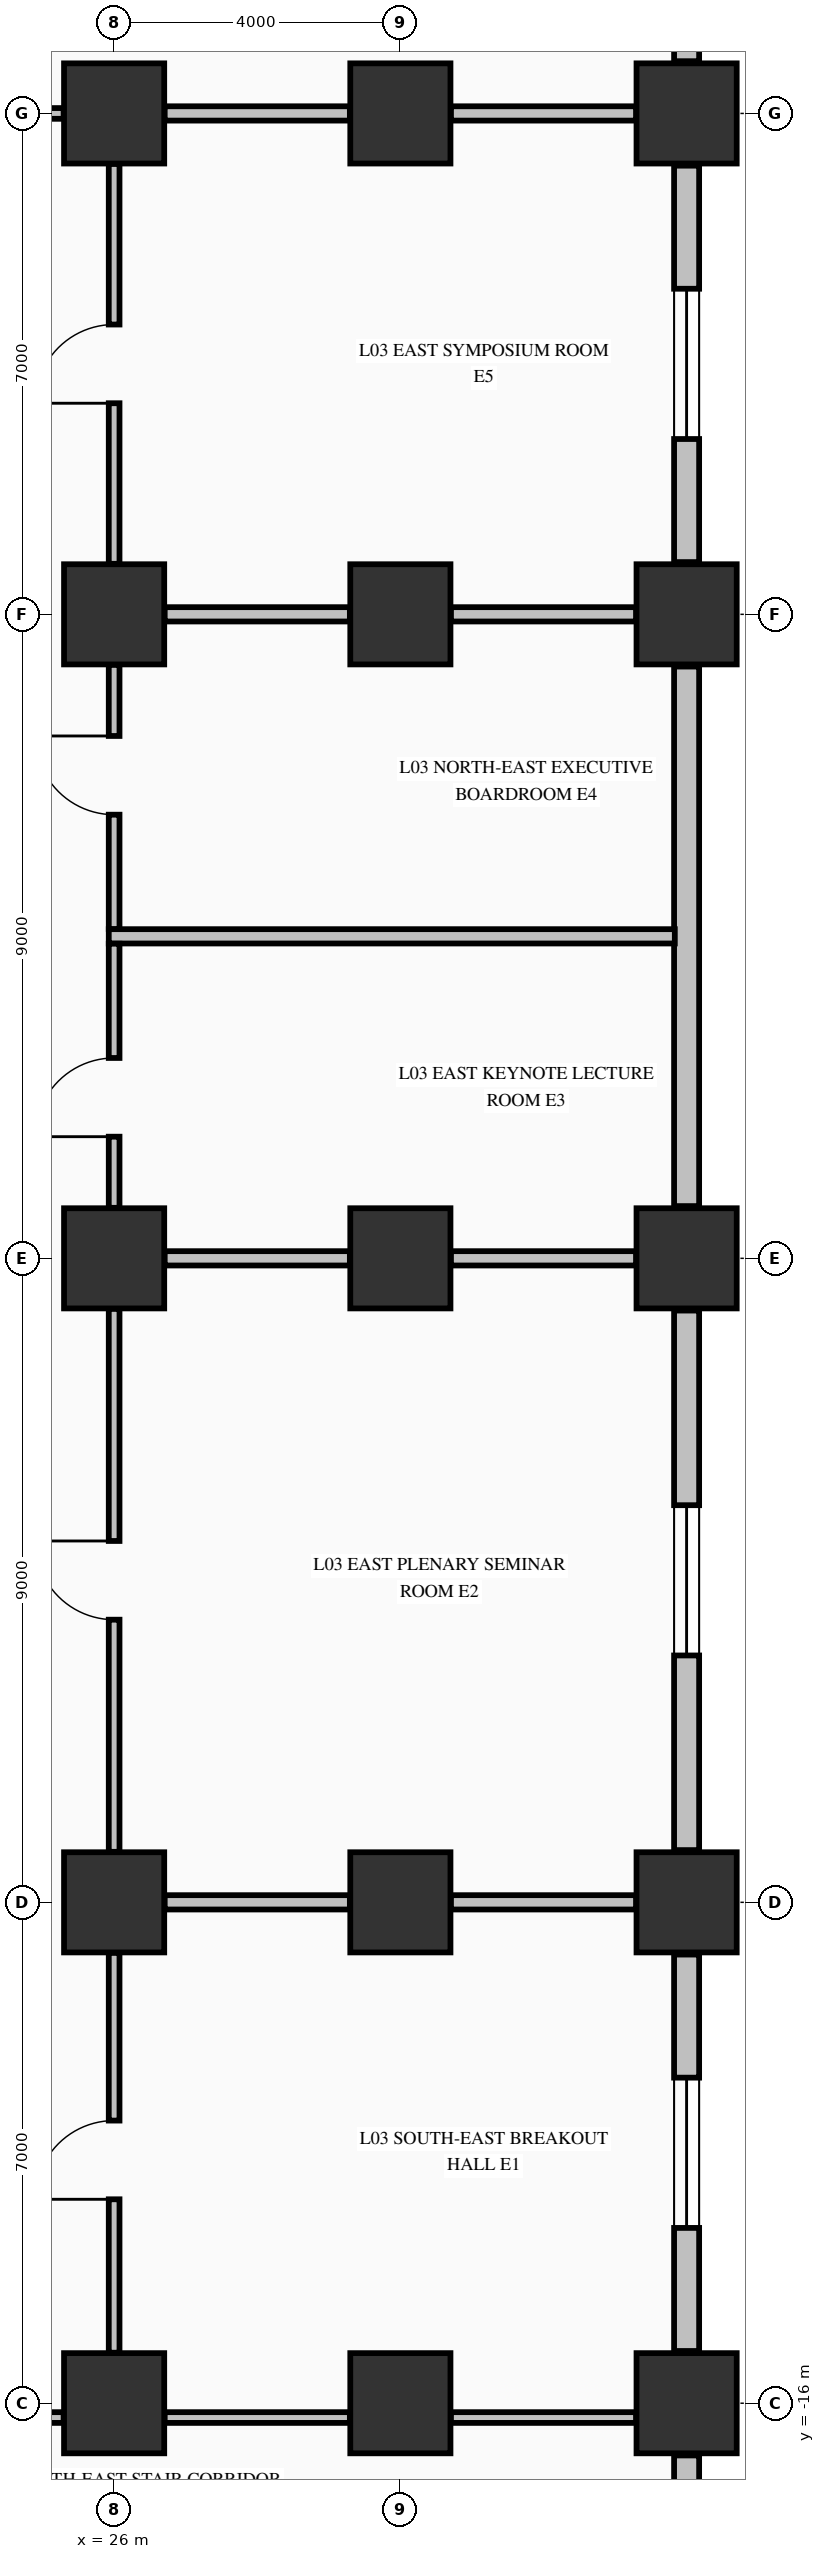
"""IFC4 building model, lengths in metres.
Left out: names, types, materials, properties, quantities, classifications, styles, units other than length and angle.
Written with IfcOpenShell. Run it as: python <this file> out.ifc"""

import sys

from ifc_helpers import new_model, si_unit, direction, frame, frame_2d, origin, origin_2d, place, context, subcontext, project, spatial, rectangle, extrude, element, fill, save


model = new_model("IFC4")
c1 = context("Model", 3, precision=1e-05, world=origin(), true_north=direction((0.0, 1.0)))
c2 = subcontext(c1, "Body", "Model", "MODEL_VIEW")
j1 = project(units=[si_unit("LENGTHUNIT", "METRE"), si_unit("PLANEANGLEUNIT", "RADIAN")], contexts=[c1])
p1 = place(None, origin())
s1 = spatial("IfcSite", under=j1, at=p1, CompositionType="ELEMENT")
p2 = place(p1, origin())
s2 = spatial("IfcBuilding", under=s1, at=p2, CompositionType="ELEMENT")
p3 = place(p2, frame((0.0, 0.0, 16.32)))
s3 = spatial("IfcBuildingStorey", under=s2, at=p3, CompositionType="ELEMENT", Elevation=16.32)
for number, where, z_axis, x_axis in (
    (1, (26.0, -16.0, 0.0), (0.0, 0.0, 1.0), (1.0, 0.0, 0.0)),
    (2, (26.0, -9.0, 0.0), (0.0, 0.0, 1.0), (1.0, 0.0, 0.0)),
    (3, (26.0, 0.0, 0.0), (0.0, 0.0, 1.0), (1.0, 0.0, 0.0)),
    (4, (26.0, 9.0, 0.0), (0.0, 0.0, 1.0), (1.0, 0.0, 0.0)),
    (5, (26.0, 16.0, 0.0), (0.0, 0.0, 1.0), (1.0, 0.0, 0.0)),
    (6, (30.0, -16.0, 0.0), (0.0, 0.0, 1.0), (1.0, 0.0, 0.0)),
    (7, (30.0, -9.0, 0.0), (0.0, 0.0, 1.0), (1.0, 0.0, 0.0)),
    (8, (30.0, 0.0, 0.0), (0.0, 0.0, 1.0), (1.0, 0.0, 0.0)),
    (9, (30.0, 9.0, 0.0), (0.0, 0.0, 1.0), (1.0, 0.0, 0.0)),
    (10, (30.0, 16.0, 0.0), (0.0, 0.0, 1.0), (1.0, 0.0, 0.0)),
    (11, (34.0, -16.0, 0.0), (0.0, 0.0, 1.0), (1.0, 0.0, 0.0)),
    (12, (34.0, -9.0, 0.0), (0.0, 0.0, 1.0), (1.0, 0.0, 0.0)),
    (13, (34.0, 0.0, 0.0), (0.0, 0.0, 1.0), (1.0, 0.0, 0.0)),
    (14, (34.0, 9.0, 0.0), (0.0, 0.0, 1.0), (1.0, 0.0, 0.0)),
    (15, (34.0, 16.0, 0.0), (0.0, 0.0, 1.0), (1.0, 0.0, 0.0)),
):
    element("IfcColumn", number, at=place(p3, frame(where, z_axis=z_axis, x_axis=x_axis)), inside=s3, PredefinedType="COLUMN", context=c2, shape_type="SweptSolid", body=[
        extrude(rectangle(XDim=1.4, YDim=1.4, at=origin_2d()), origin(), (0.0, 0.0, 1.0), 4.99),
    ])
p4 = place(p3, frame((34.0, -16.73, 0.0), z_axis=(0.0, 0.0, 1.0), x_axis=(0.0, -1.0, 0.0)))
e16 = element("IfcWall", 16, at=p4, inside=s3, PredefinedType="STANDARD", context=c2, shape_type="SweptSolid", body=[
    extrude(rectangle(XDim=4.54, YDim=0.35, at=frame_2d((2.27, 0.0))), origin(), (0.0, 0.0, 1.0), 4.99),
])
p5 = place(p3, frame((34.0, -9.73, 0.0), z_axis=(0.0, 0.0, 1.0), x_axis=(0.0, -1.0, 0.0)))
e17 = element("IfcWall", 17, at=p5, inside=s3, PredefinedType="STANDARD", context=c2, shape_type="SweptSolid", body=[
    extrude(rectangle(XDim=5.54, YDim=0.35, at=frame_2d((2.77, 0.0))), origin(), (0.0, 0.0, 1.0), 3.332),
])
p6 = place(p5, frame((1.72, 0.0, 0.75)))
e18 = element("IfcOpeningElement", 18, at=p6, cuts=e17, PredefinedType="OPENING", context=c2, shape_type="SweptSolid", body=[
    extrude(rectangle(XDim=2.1, YDim=1.75, at=frame_2d((1.05, 0.875))), frame((0.0, 0.185, 0.0), z_axis=(0.0, -1.0, 0.0), x_axis=(1.0, 0.0, 0.0)), (0.0, 0.0, 1.0), 0.37),
])
p7 = place(p3, frame((34.0, -0.73, 0.0), z_axis=(0.0, 0.0, 1.0), x_axis=(0.0, -1.0, 0.0)))
e19 = element("IfcWall", 19, at=p7, inside=s3, PredefinedType="STANDARD", context=c2, shape_type="SweptSolid", body=[
    extrude(rectangle(XDim=7.54, YDim=0.35, at=frame_2d((3.77, 0.0))), origin(), (0.0, 0.0, 1.0), 3.332),
])
p8 = place(p7, frame((2.72, 0.0, 0.75)))
e20 = element("IfcOpeningElement", 20, at=p8, cuts=e19, PredefinedType="OPENING", context=c2, shape_type="SweptSolid", body=[
    extrude(rectangle(XDim=2.1, YDim=1.75, at=frame_2d((1.05, 0.875))), frame((0.0, 0.185, 0.0), z_axis=(0.0, -1.0, 0.0), x_axis=(1.0, 0.0, 0.0)), (0.0, 0.0, 1.0), 0.37),
])
p9 = place(p3, frame((34.0, 8.27, 0.0), z_axis=(0.0, 0.0, 1.0), x_axis=(0.0, -1.0, 0.0)))
e21 = element("IfcWall", 21, at=p9, inside=s3, PredefinedType="STANDARD", context=c2, shape_type="SweptSolid", body=[
    extrude(rectangle(XDim=7.54, YDim=0.35, at=frame_2d((3.77, 0.0))), origin(), (0.0, 0.0, 1.0), 3.332),
])
p10 = place(p3, frame((34.0, 15.27, 0.0), z_axis=(0.0, 0.0, 1.0), x_axis=(0.0, -1.0, 0.0)))
e22 = element("IfcWall", 22, at=p10, inside=s3, PredefinedType="STANDARD", context=c2, shape_type="SweptSolid", body=[
    extrude(rectangle(XDim=5.54, YDim=0.35, at=frame_2d((2.77, 0.0))), origin(), (0.0, 0.0, 1.0), 3.332),
])
p11 = place(p10, frame((1.72, 0.0, 0.75)))
e23 = element("IfcOpeningElement", 23, at=p11, cuts=e22, PredefinedType="OPENING", context=c2, shape_type="SweptSolid", body=[
    extrude(rectangle(XDim=2.1, YDim=1.75, at=frame_2d((1.05, 0.875))), frame((0.0, 0.185, 0.0), z_axis=(0.0, -1.0, 0.0), x_axis=(1.0, 0.0, 0.0)), (0.0, 0.0, 1.0), 0.37),
])
p12 = place(p3, frame((34.0, 21.27, 0.0), z_axis=(0.0, 0.0, 1.0), x_axis=(0.0, -1.0, 0.0)))
e24 = element("IfcWall", 24, at=p12, inside=s3, PredefinedType="STANDARD", context=c2, shape_type="SweptSolid", body=[
    extrude(rectangle(XDim=4.54, YDim=0.35, at=frame_2d((2.27, 0.0))), origin(), (0.0, 0.0, 1.0), 4.99),
])
p13 = place(p3, frame((20.806, -16.2, 0.0), z_axis=(0.0, 0.0, 1.0), x_axis=(1.0, 0.0, 0.0)))
e25 = element("IfcWall", 25, at=p13, inside=s3, PredefinedType="PARTITIONING", context=c2, shape_type="SweptSolid", body=[
    extrude(rectangle(XDim=4.488, YDim=0.15, at=frame_2d((2.244, 0.0))), origin(), (0.0, 0.0, 1.0), 3.332),
])
p14 = place(p13, frame((0.15, 0.0, 0.0)))
e26 = element("IfcOpeningElement", 26, at=p14, cuts=e25, PredefinedType="OPENING", context=c2, shape_type="SweptSolid", body=[
    extrude(rectangle(XDim=1.1, YDim=2.15, at=frame_2d((0.55, 1.075))), frame((0.0, 0.085, 0.0), z_axis=(0.0, -1.0, 0.0), x_axis=(1.0, 0.0, 0.0)), (0.0, 0.0, 1.0), 0.17),
])
p15 = place(p13, frame((2.844, 0.0, 0.0)))
e27 = element("IfcOpeningElement", 27, at=p15, cuts=e25, PredefinedType="OPENING", context=c2, shape_type="SweptSolid", body=[
    extrude(rectangle(XDim=1.1, YDim=2.15, at=frame_2d((0.55, 1.075))), frame((0.0, 0.085, 0.0), z_axis=(0.0, -1.0, 0.0), x_axis=(1.0, 0.0, 0.0)), (0.0, 0.0, 1.0), 0.17),
])
for number, where, z_axis, x_axis in (
    (28, (26.706, -16.2, 0.0), (0.0, 0.0, 1.0), (1.0, 0.0, 0.0)),
    (29, (30.706, -16.2, 0.0), (0.0, 0.0, 1.0), (1.0, 0.0, 0.0)),
):
    element("IfcWall", number, at=place(p3, frame(where, z_axis=z_axis, x_axis=x_axis)), inside=s3, PredefinedType="PARTITIONING", context=c2, shape_type="SweptSolid", body=[
        extrude(rectangle(XDim=2.588, YDim=0.15, at=frame_2d((1.294, 0.0))), origin(), (0.0, 0.0, 1.0), 3.332),
    ])
for number, where, z_axis, x_axis in (
    (30, (26.706, -9.0, 0.0), (0.0, 0.0, 1.0), (1.0, 0.0, 0.0)),
    (31, (30.706, -9.0, 0.0), (0.0, 0.0, 1.0), (1.0, 0.0, 0.0)),
    (32, (26.706, 0.0, 0.0), (0.0, 0.0, 1.0), (1.0, 0.0, 0.0)),
    (33, (30.706, 0.0, 0.0), (0.0, 0.0, 1.0), (1.0, 0.0, 0.0)),
):
    element("IfcWall", number, at=place(p3, frame(where, z_axis=z_axis, x_axis=x_axis)), inside=s3, PredefinedType="PARTITIONING", context=c2, shape_type="SweptSolid", body=[
        extrude(rectangle(XDim=2.588, YDim=0.2, at=frame_2d((1.294, 0.0))), origin(), (0.0, 0.0, 1.0), 3.332),
    ])
p16 = place(p3, frame((25.925, 4.5, 0.0), z_axis=(0.0, 0.0, 1.0), x_axis=(1.0, 0.0, 0.0)))
e34 = element("IfcWall", 34, at=p16, inside=s3, PredefinedType="PARTITIONING", context=c2, shape_type="SweptSolid", body=[
    extrude(rectangle(XDim=7.91, YDim=0.2, at=frame_2d((3.955, 0.0))), origin(), (0.0, 0.0, 1.0), 4.38),
])
for number, where, z_axis, x_axis in (
    (35, (26.706, 9.0, 0.0), (0.0, 0.0, 1.0), (1.0, 0.0, 0.0)),
    (36, (30.706, 9.0, 0.0), (0.0, 0.0, 1.0), (1.0, 0.0, 0.0)),
):
    element("IfcWall", number, at=place(p3, frame(where, z_axis=z_axis, x_axis=x_axis)), inside=s3, PredefinedType="PARTITIONING", context=c2, shape_type="SweptSolid", body=[
        extrude(rectangle(XDim=2.588, YDim=0.2, at=frame_2d((1.294, 0.0))), origin(), (0.0, 0.0, 1.0), 3.332),
    ])
p17 = place(p3, frame((20.806, 16.0, 0.0), z_axis=(0.0, 0.0, 1.0), x_axis=(1.0, 0.0, 0.0)))
e37 = element("IfcWall", 37, at=p17, inside=s3, PredefinedType="PARTITIONING", context=c2, shape_type="SweptSolid", body=[
    extrude(rectangle(XDim=4.488, YDim=0.15, at=frame_2d((2.244, 0.0))), origin(), (0.0, 0.0, 1.0), 3.332),
])
p18 = place(p17, frame((0.15, 0.0, 0.0)))
e38 = element("IfcOpeningElement", 38, at=p18, cuts=e37, PredefinedType="OPENING", context=c2, shape_type="SweptSolid", body=[
    extrude(rectangle(XDim=1.1, YDim=2.15, at=frame_2d((0.55, 1.075))), frame((0.0, 0.085, 0.0), z_axis=(0.0, -1.0, 0.0), x_axis=(1.0, 0.0, 0.0)), (0.0, 0.0, 1.0), 0.17),
])
p19 = place(p17, frame((2.844, 0.0, 0.0)))
e39 = element("IfcOpeningElement", 39, at=p19, cuts=e37, PredefinedType="OPENING", context=c2, shape_type="SweptSolid", body=[
    extrude(rectangle(XDim=1.1, YDim=2.15, at=frame_2d((0.55, 1.075))), frame((0.0, 0.085, 0.0), z_axis=(0.0, -1.0, 0.0), x_axis=(1.0, 0.0, 0.0)), (0.0, 0.0, 1.0), 0.17),
])
for number, where, z_axis, x_axis in (
    (40, (26.706, 16.0, 0.0), (0.0, 0.0, 1.0), (1.0, 0.0, 0.0)),
    (41, (30.706, 16.0, 0.0), (0.0, 0.0, 1.0), (1.0, 0.0, 0.0)),
):
    element("IfcWall", number, at=place(p3, frame(where, z_axis=z_axis, x_axis=x_axis)), inside=s3, PredefinedType="PARTITIONING", context=c2, shape_type="SweptSolid", body=[
        extrude(rectangle(XDim=2.588, YDim=0.2, at=frame_2d((1.294, 0.0))), origin(), (0.0, 0.0, 1.0), 3.332),
    ])
p20 = place(p3, frame((26.0, -15.294, 0.0), z_axis=(0.0, 0.0, 1.0), x_axis=(0.0, 1.0, 0.0)))
e42 = element("IfcWall", 42, at=p20, inside=s3, PredefinedType="PARTITIONING", context=c2, shape_type="SweptSolid", body=[
    extrude(rectangle(XDim=5.588, YDim=0.15, at=frame_2d((2.794, 0.0))), origin(), (0.0, 0.0, 1.0), 3.332),
])
p21 = place(p20, frame((2.144, 0.0, 0.0)))
e43 = element("IfcOpeningElement", 43, at=p21, cuts=e42, PredefinedType="OPENING", context=c2, shape_type="SweptSolid", body=[
    extrude(rectangle(XDim=1.1, YDim=2.15, at=frame_2d((0.55, 1.075))), frame((0.0, 0.085, 0.0), z_axis=(0.0, -1.0, 0.0), x_axis=(1.0, 0.0, 0.0)), (0.0, 0.0, 1.0), 0.17),
])
p22 = place(p3, frame((26.0, -8.294, 0.0), z_axis=(0.0, 0.0, 1.0), x_axis=(0.0, 1.0, 0.0)))
e44 = element("IfcWall", 44, at=p22, inside=s3, PredefinedType="PARTITIONING", context=c2, shape_type="SweptSolid", body=[
    extrude(rectangle(XDim=7.588, YDim=0.15, at=frame_2d((3.794, 0.0))), origin(), (0.0, 0.0, 1.0), 3.332),
])
p23 = place(p22, frame((3.244, 0.0, 0.0)))
e45 = element("IfcOpeningElement", 45, at=p23, cuts=e44, PredefinedType="OPENING", context=c2, shape_type="SweptSolid", body=[
    extrude(rectangle(XDim=1.1, YDim=2.15, at=frame_2d((0.55, 1.075))), frame((0.0, 0.085, 0.0), z_axis=(0.0, -1.0, 0.0), x_axis=(1.0, 0.0, 0.0)), (0.0, 0.0, 1.0), 0.17),
])
p24 = place(p3, frame((26.0, 0.706, 0.0), z_axis=(0.0, 0.0, 1.0), x_axis=(0.0, 1.0, 0.0)))
e46 = element("IfcWall", 46, at=p24, inside=s3, PredefinedType="PARTITIONING", context=c2, shape_type="SweptSolid", body=[
    extrude(rectangle(XDim=3.691, YDim=0.15, at=frame_2d((1.845, 0.0))), origin(), (0.0, 0.0, 1.0), 3.332),
])
p25 = place(p24, frame((0.994, 0.0, 0.0)))
e47 = element("IfcOpeningElement", 47, at=p25, cuts=e46, PredefinedType="OPENING", context=c2, shape_type="SweptSolid", body=[
    extrude(rectangle(XDim=1.1, YDim=2.15, at=frame_2d((0.55, 1.075))), frame((0.0, 0.085, 0.0), z_axis=(0.0, -1.0, 0.0), x_axis=(1.0, 0.0, 0.0)), (0.0, 0.0, 1.0), 0.17),
])
p26 = place(p3, frame((26.0, 4.603, 0.0), z_axis=(0.0, 0.0, 1.0), x_axis=(0.0, 1.0, 0.0)))
e48 = element("IfcWall", 48, at=p26, inside=s3, PredefinedType="PARTITIONING", context=c2, shape_type="SweptSolid", body=[
    extrude(rectangle(XDim=3.691, YDim=0.15, at=frame_2d((1.845, 0.0))), origin(), (0.0, 0.0, 1.0), 3.332),
])
p27 = place(p26, frame((1.597, 0.0, 0.0)))
e49 = element("IfcOpeningElement", 49, at=p27, cuts=e48, PredefinedType="OPENING", context=c2, shape_type="SweptSolid", body=[
    extrude(rectangle(XDim=1.1, YDim=2.15, at=frame_2d((0.55, 1.075))), frame((0.0, 0.085, 0.0), z_axis=(0.0, -1.0, 0.0), x_axis=(1.0, 0.0, 0.0)), (0.0, 0.0, 1.0), 0.17),
])
p28 = place(p3, frame((26.0, 9.706, 0.0), z_axis=(0.0, 0.0, 1.0), x_axis=(0.0, 1.0, 0.0)))
e50 = element("IfcWall", 50, at=p28, inside=s3, PredefinedType="PARTITIONING", context=c2, shape_type="SweptSolid", body=[
    extrude(rectangle(XDim=5.588, YDim=0.15, at=frame_2d((2.794, 0.0))), origin(), (0.0, 0.0, 1.0), 3.332),
])
p29 = place(p28, frame((2.244, 0.0, 0.0)))
e51 = element("IfcOpeningElement", 51, at=p29, cuts=e50, PredefinedType="OPENING", context=c2, shape_type="SweptSolid", body=[
    extrude(rectangle(XDim=1.1, YDim=2.15, at=frame_2d((0.55, 1.075))), frame((0.0, 0.085, 0.0), z_axis=(0.0, -1.0, 0.0), x_axis=(1.0, 0.0, 0.0)), (0.0, 0.0, 1.0), 0.17),
])
p30 = place(p6, origin())
e52 = element("IfcWindow", 52, at=p30, inside=s3, PartitioningType="SINGLE_PANEL", PredefinedType="WINDOW", context=c2, shape_type="SweptSolid", body=[
    extrude(rectangle(XDim=2.1, YDim=1.75, at=frame_2d((1.05, 0.875))), frame((0.0, 0.03, 0.0), z_axis=(0.0, -1.0, 0.0), x_axis=(1.0, 0.0, 0.0)), (0.0, 0.0, 1.0), 0.06),
])
fill(e18, e52)
p31 = place(p8, origin())
e53 = element("IfcWindow", 53, at=p31, inside=s3, PartitioningType="SINGLE_PANEL", PredefinedType="WINDOW", context=c2, shape_type="SweptSolid", body=[
    extrude(rectangle(XDim=2.1, YDim=1.75, at=frame_2d((1.05, 0.875))), frame((0.0, 0.03, 0.0), z_axis=(0.0, -1.0, 0.0), x_axis=(1.0, 0.0, 0.0)), (0.0, 0.0, 1.0), 0.06),
])
fill(e20, e53)
p32 = place(p11, origin())
e54 = element("IfcWindow", 54, at=p32, inside=s3, PartitioningType="SINGLE_PANEL", PredefinedType="WINDOW", context=c2, shape_type="SweptSolid", body=[
    extrude(rectangle(XDim=2.1, YDim=1.75, at=frame_2d((1.05, 0.875))), frame((0.0, 0.03, 0.0), z_axis=(0.0, -1.0, 0.0), x_axis=(1.0, 0.0, 0.0)), (0.0, 0.0, 1.0), 0.06),
])
fill(e23, e54)
p33 = place(p21, origin())
e55 = element("IfcDoor", 55, at=p33, inside=s3, OperationType="SINGLE_SWING_LEFT", PredefinedType="DOOR", context=c2, shape_type="SweptSolid", body=[
    extrude(rectangle(XDim=1.1, YDim=2.15, at=frame_2d((0.55, 1.075))), frame((0.0, 0.025, 0.0), z_axis=(0.0, -1.0, 0.0), x_axis=(1.0, 0.0, 0.0)), (0.0, 0.0, 1.0), 0.05),
])
fill(e43, e55)
p34 = place(p23, origin())
e56 = element("IfcDoor", 56, at=p34, inside=s3, OperationType="SINGLE_SWING_RIGHT", PredefinedType="DOOR", context=c2, shape_type="SweptSolid", body=[
    extrude(rectangle(XDim=1.1, YDim=2.15, at=frame_2d((0.55, 1.075))), frame((0.0, 0.025, 0.0), z_axis=(0.0, -1.0, 0.0), x_axis=(1.0, 0.0, 0.0)), (0.0, 0.0, 1.0), 0.05),
])
fill(e45, e56)
p35 = place(p25, origin())
e57 = element("IfcDoor", 57, at=p35, inside=s3, OperationType="SINGLE_SWING_LEFT", PredefinedType="DOOR", context=c2, shape_type="SweptSolid", body=[
    extrude(rectangle(XDim=1.1, YDim=2.15, at=frame_2d((0.55, 1.075))), frame((0.0, 0.025, 0.0), z_axis=(0.0, -1.0, 0.0), x_axis=(1.0, 0.0, 0.0)), (0.0, 0.0, 1.0), 0.05),
])
fill(e47, e57)
p36 = place(p27, origin())
e58 = element("IfcDoor", 58, at=p36, inside=s3, OperationType="SINGLE_SWING_RIGHT", PredefinedType="DOOR", context=c2, shape_type="SweptSolid", body=[
    extrude(rectangle(XDim=1.1, YDim=2.15, at=frame_2d((0.55, 1.075))), frame((0.0, 0.025, 0.0), z_axis=(0.0, -1.0, 0.0), x_axis=(1.0, 0.0, 0.0)), (0.0, 0.0, 1.0), 0.05),
])
fill(e49, e58)
p37 = place(p29, origin())
e59 = element("IfcDoor", 59, at=p37, inside=s3, OperationType="SINGLE_SWING_LEFT", PredefinedType="DOOR", context=c2, shape_type="SweptSolid", body=[
    extrude(rectangle(XDim=1.1, YDim=2.15, at=frame_2d((0.55, 1.075))), frame((0.0, 0.025, 0.0), z_axis=(0.0, -1.0, 0.0), x_axis=(1.0, 0.0, 0.0)), (0.0, 0.0, 1.0), 0.05),
])
fill(e51, e59)
save(model, sys.argv[1])
